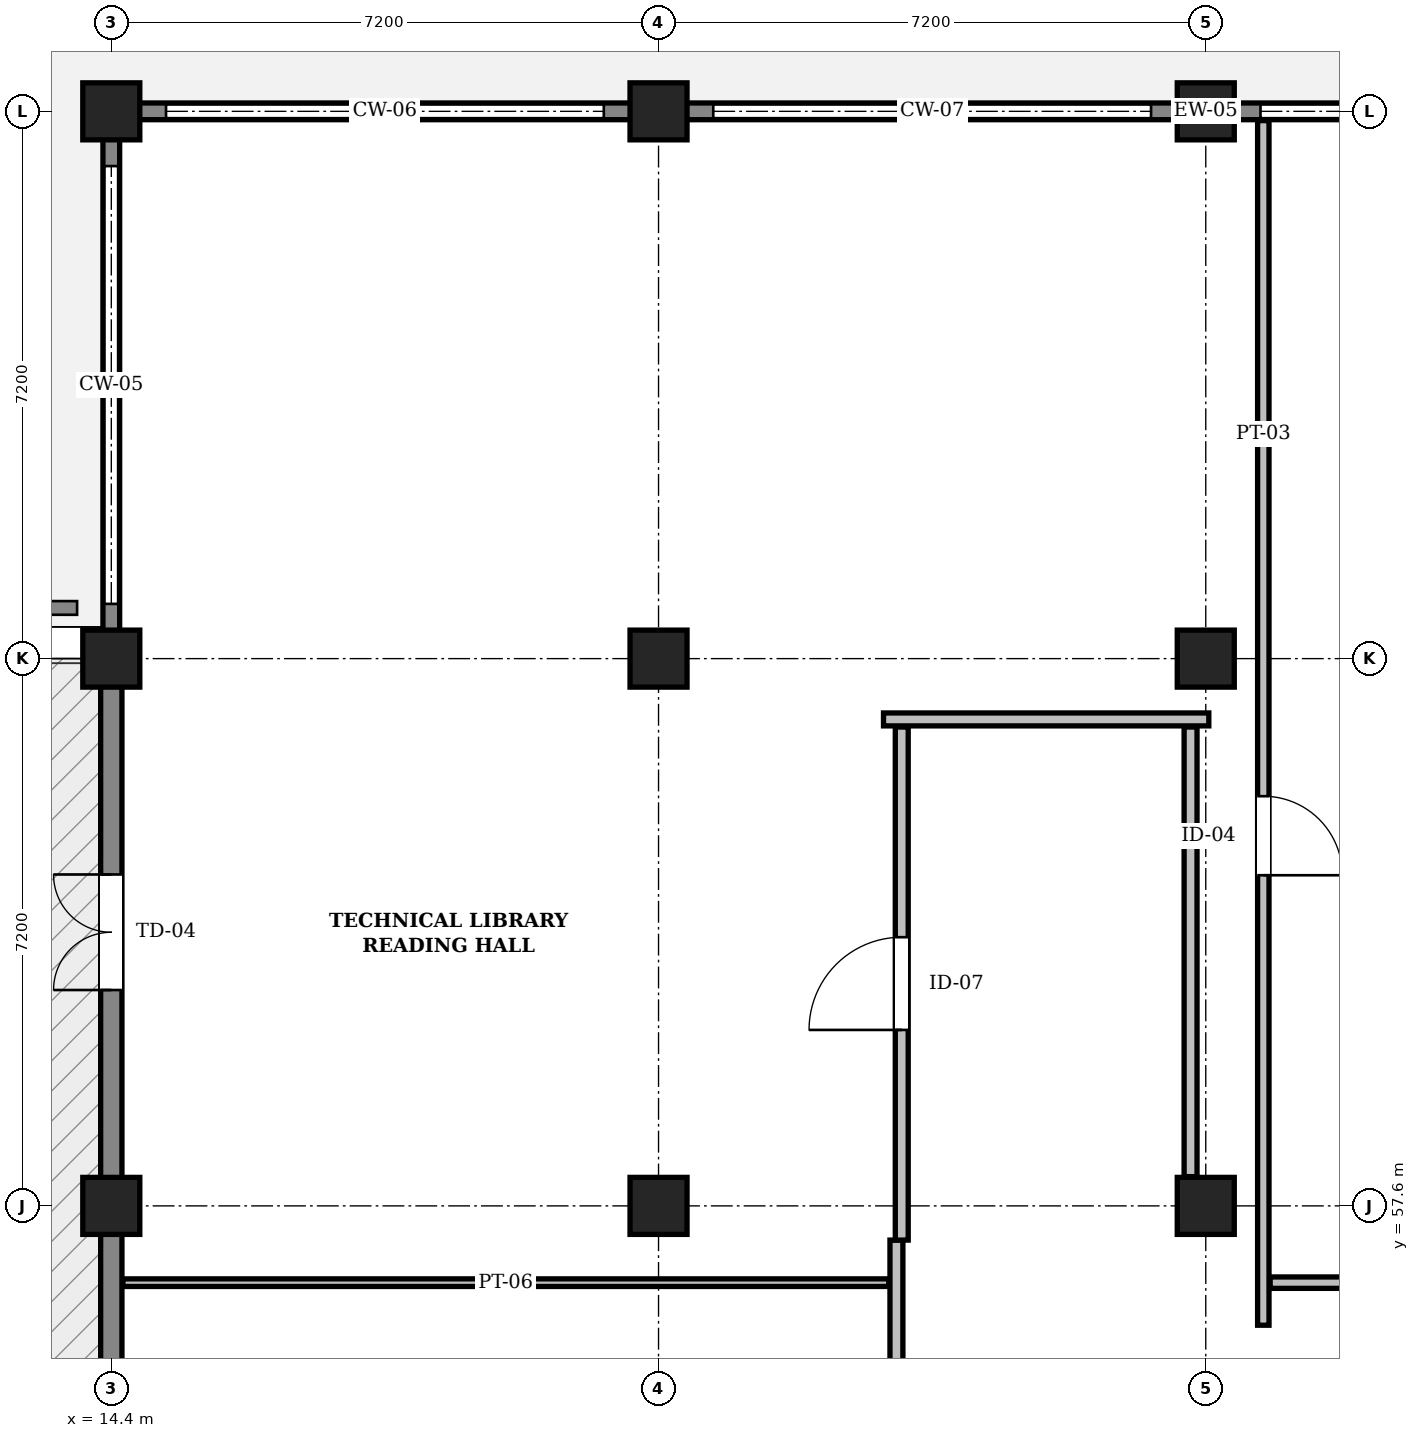
"""IFC4 building model, lengths in metres.
Left out: names, types, materials, properties, quantities, classifications, styles, units other than length and angle.
Written with IfcOpenShell. Run it as: python <this file> out.ifc"""

import sys

from ifc_helpers import new_model, si_unit, direction, frame, frame_2d, origin, origin_2d, place, context, subcontext, project, spatial, rectangle, extrude, element, fill, save


model = new_model("IFC4")
c1 = context("Model", 3, precision=1e-05, world=origin(), true_north=direction((0.0, 1.0)))
c2 = subcontext(c1, "Body", "Model", "MODEL_VIEW")
j1 = project(units=[si_unit("LENGTHUNIT", "METRE"), si_unit("PLANEANGLEUNIT", "RADIAN")], contexts=[c1])
p1 = place(None, origin())
s1 = spatial("IfcSite", under=j1, at=p1, CompositionType="ELEMENT")
p2 = place(p1, origin())
s2 = spatial("IfcBuilding", under=s1, at=p2, CompositionType="ELEMENT")
p3 = place(p2, frame((0.0, 0.0, 14.4)))
s3 = spatial("IfcBuildingStorey", under=s2, at=p3, CompositionType="ELEMENT", Elevation=14.4)
for number, where, z_axis, x_axis in (
    (1, (14.4, 57.6, 0.0), (0.0, 0.0, 1.0), (1.0, 0.0, 0.0)),
    (2, (14.4, 64.8, 0.0), (0.0, 0.0, 1.0), (1.0, 0.0, 0.0)),
    (3, (14.4, 72.0, 0.0), (0.0, 0.0, 1.0), (1.0, 0.0, 0.0)),
    (4, (21.6, 57.6, 0.0), (0.0, 0.0, 1.0), (1.0, 0.0, 0.0)),
    (5, (21.6, 64.8, 0.0), (0.0, 0.0, 1.0), (1.0, 0.0, 0.0)),
    (6, (21.6, 72.0, 0.0), (0.0, 0.0, 1.0), (1.0, 0.0, 0.0)),
    (7, (28.8, 57.6, 0.0), (0.0, 0.0, 1.0), (1.0, 0.0, 0.0)),
    (8, (28.8, 64.8, 0.0), (0.0, 0.0, 1.0), (1.0, 0.0, 0.0)),
    (9, (28.8, 72.0, 0.0), (0.0, 0.0, 1.0), (1.0, 0.0, 0.0)),
):
    element("IfcColumn", number, at=place(p3, frame(where, z_axis=z_axis, x_axis=x_axis)), inside=s3, PredefinedType="COLUMN", context=c2, shape_type="SweptSolid", body=[
        extrude(rectangle(XDim=0.75, YDim=0.75, at=origin_2d()), origin(), (0.0, 0.0, 1.0), 4.5),
    ])
p4 = place(p3, frame((14.4, 50.4, 0.0), z_axis=(0.0, 0.0, 1.0), x_axis=(0.0, 1.0, 0.0)))
e10 = element("IfcWall", 10, at=p4, inside=s3, PredefinedType="SOLIDWALL", context=c2, shape_type="SweptSolid", body=[
    extrude(rectangle(XDim=7.2, YDim=0.28, at=frame_2d((3.6, 0.0))), origin(), (0.0, 0.0, 1.0), 4.22),
])
p5 = place(p4, frame((2.94, 0.0, 0.0)))
e11 = element("IfcOpeningElement", 11, at=p5, cuts=e10, PredefinedType="OPENING", context=c2, shape_type="SweptSolid", body=[
    extrude(rectangle(XDim=1.32, YDim=2.2, at=frame_2d((0.66, 1.1))), frame((0.0, 0.152, 0.0), z_axis=(0.0, -1.0, 0.0), x_axis=(1.0, 0.0, 0.0)), (0.0, 0.0, 1.0), 0.304),
])
p6 = place(p3, frame((14.4, 57.6, 0.0), z_axis=(0.0, 0.0, 1.0), x_axis=(0.0, 1.0, 0.0)))
e12 = element("IfcWall", 12, at=p6, inside=s3, PredefinedType="SOLIDWALL", context=c2, shape_type="SweptSolid", body=[
    extrude(rectangle(XDim=7.2, YDim=0.28, at=frame_2d((3.6, 0.0))), origin(), (0.0, 0.0, 1.0), 4.22),
])
p7 = place(p6, frame((2.84, 0.0, 0.0)))
e13 = element("IfcOpeningElement", 13, at=p7, cuts=e12, PredefinedType="OPENING", context=c2, shape_type="SweptSolid", body=[
    extrude(rectangle(XDim=1.52, YDim=2.22, at=frame_2d((0.76, 1.11))), frame((0.0, 0.152, 0.0), z_axis=(0.0, -1.0, 0.0), x_axis=(1.0, 0.0, 0.0)), (0.0, 0.0, 1.0), 0.304),
])
p8 = place(p3, frame((14.4, 64.8, 0.0), z_axis=(0.0, 0.0, 1.0), x_axis=(0.0, 1.0, 0.0)))
e14 = element("IfcWall", 14, at=p8, inside=s3, PredefinedType="SOLIDWALL", context=c2, shape_type="SweptSolid", body=[
    extrude(rectangle(XDim=7.048, YDim=0.22, at=frame_2d((3.524, 0.0))), origin(), (0.0, 0.0, 1.0), 1.24),
])
p9 = place(p3, frame((14.25, 72.0, 0.0), z_axis=(0.0, 0.0, 1.0), x_axis=(1.0, 0.0, 0.0)))
e15 = element("IfcWall", 15, at=p9, inside=s3, PredefinedType="SOLIDWALL", context=c2, shape_type="SweptSolid", body=[
    extrude(rectangle(XDim=7.35, YDim=0.22, at=frame_2d((3.675, 0.0))), origin(), (0.0, 0.0, 1.0), 1.24),
])
for number, where, z_axis, x_axis in (
    (16, (21.6, 72.0, 0.0), (0.0, 0.0, 1.0), (1.0, 0.0, 0.0)),
    (17, (28.8, 72.0, 0.0), (0.0, 0.0, 1.0), (1.0, 0.0, 0.0)),
):
    element("IfcWall", number, at=place(p3, frame(where, z_axis=z_axis, x_axis=x_axis)), inside=s3, PredefinedType="SOLIDWALL", context=c2, shape_type="SweptSolid", body=[
        extrude(rectangle(XDim=7.2, YDim=0.22, at=frame_2d((3.6, 0.0))), origin(), (0.0, 0.0, 1.0), 1.24),
    ])
p10 = place(p3, frame((13.95, 65.467, 0.0), z_axis=(0.0, 0.0, 1.0), x_axis=(-0.999999401079, 0.001094459691, 0.0)))
e18 = element("IfcWall", 18, at=p10, inside=s3, PredefinedType="PARAPET", context=c2, shape_type="SweptSolid", body=[
    extrude(rectangle(XDim=2.9, YDim=0.18, at=frame_2d((1.45, 0.0))), origin(), (0.0, 0.0, 1.0), 0.95),
])
p11 = place(p3, frame((24.73, 38.372, 0.0), z_axis=(0.0, 0.0, 1.0), x_axis=(0.0, 1.0, 0.0)))
e19 = element("IfcWall", 19, at=p11, inside=s3, PredefinedType="PARTITIONING", context=c2, shape_type="SweptSolid", body=[
    extrude(rectangle(XDim=18.778, YDim=0.17, at=frame_2d((9.389, 0.0))), origin(), (0.0, 0.0, 1.0), 4.16),
])
p12 = place(p11, frame((8.549, 0.0, 0.0)))
e20 = element("IfcOpeningElement", 20, at=p12, cuts=e19, PredefinedType="OPENING", context=c2, shape_type="SweptSolid", body=[
    extrude(rectangle(XDim=1.68, YDim=2.28, at=frame_2d((0.84, 1.14))), frame((0.0, 0.097, 0.0), z_axis=(0.0, -1.0, 0.0), x_axis=(1.0, 0.0, 0.0)), (0.0, 0.0, 1.0), 0.194),
])
p13 = place(p3, frame((24.56, 64.0, 0.0), z_axis=(0.0, 0.0, 1.0), x_axis=(1.0, 0.0, 0.0)))
e21 = element("IfcWall", 21, at=p13, inside=s3, PredefinedType="PARTITIONING", context=c2, shape_type="SweptSolid", body=[
    extrude(rectangle(XDim=4.28, YDim=0.17, at=frame_2d((2.14, 0.0))), origin(), (0.0, 0.0, 1.0), 4.16),
])
p14 = place(p3, frame((28.6, 57.985, 0.0), z_axis=(0.0, 0.0, 1.0), x_axis=(0.0, 1.0, 0.0)))
e22 = element("IfcWall", 22, at=p14, inside=s3, PredefinedType="PARTITIONING", context=c2, shape_type="SweptSolid", body=[
    extrude(rectangle(XDim=5.915, YDim=0.17, at=frame_2d((2.958, 0.0))), origin(), (0.0, 0.0, 1.0), 3.73),
])
p15 = place(p3, frame((24.8, 57.15, 0.0), z_axis=(0.0, 0.0, 1.0), x_axis=(0.0, 1.0, 0.0)))
e23 = element("IfcWall", 23, at=p15, inside=s3, PredefinedType="PARTITIONING", context=c2, shape_type="SweptSolid", body=[
    extrude(rectangle(XDim=6.75, YDim=0.17, at=frame_2d((3.375, 0.0))), origin(), (0.0, 0.0, 1.0), 4.16),
])
p16 = place(p15, frame((2.765, 0.0, 0.0)))
e24 = element("IfcOpeningElement", 24, at=p16, cuts=e23, PredefinedType="OPENING", context=c2, shape_type="SweptSolid", body=[
    extrude(rectangle(XDim=1.22, YDim=2.22, at=frame_2d((0.61, 1.11))), frame((0.0, 0.097, 0.0), z_axis=(0.0, -1.0, 0.0), x_axis=(1.0, 0.0, 0.0)), (0.0, 0.0, 1.0), 0.194),
])
p17 = place(p3, frame((14.552, 56.59, 0.0), z_axis=(0.0, 0.0, 1.0), x_axis=(1.0, 0.0, 0.0)))
e25 = element("IfcWall", 25, at=p17, inside=s3, PredefinedType="PARTITIONING", context=c2, shape_type="SweptSolid", body=[
    extrude(rectangle(XDim=10.078, YDim=0.1, at=frame_2d((5.039, 0.0))), origin(), (0.0, 0.0, 1.0), 4.16),
])
p18 = place(p3, frame((29.557, 56.03, 0.0), z_axis=(0.0, 0.0, 1.0), x_axis=(0.0, 1.0, 0.0)))
e26 = element("IfcWall", 26, at=p18, inside=s3, PredefinedType="PARTITIONING", context=c2, shape_type="SweptSolid", body=[
    extrude(rectangle(XDim=15.848, YDim=0.15, at=frame_2d((7.924, 0.0))), origin(), (0.0, 0.0, 1.0), 4.16),
])
p19 = place(p18, frame((5.92, 0.0, 0.0)))
e27 = element("IfcOpeningElement", 27, at=p19, cuts=e26, PredefinedType="OPENING", context=c2, shape_type="SweptSolid", body=[
    extrude(rectangle(XDim=1.04, YDim=2.18, at=frame_2d((0.52, 1.09))), frame((0.0, 0.087, 0.0), z_axis=(0.0, -1.0, 0.0), x_axis=(1.0, 0.0, 0.0)), (0.0, 0.0, 1.0), 0.174),
])
p20 = place(p3, frame((29.647, 56.59, 0.0), z_axis=(0.0, 0.0, 1.0), x_axis=(1.0, 0.0, 0.0)))
e28 = element("IfcWall", 28, at=p20, inside=s3, PredefinedType="PARTITIONING", context=c2, shape_type="SweptSolid", body=[
    extrude(rectangle(XDim=10.198, YDim=0.15, at=frame_2d((5.099, 0.0))), origin(), (0.0, 0.0, 1.0), 4.16),
])
p21 = place(p7, origin())
e29 = element("IfcDoor", 29, at=p21, inside=s3, OperationType="DOUBLE_DOOR_SINGLE_SWING", PredefinedType="DOOR", context=c2, shape_type="SweptSolid", body=[
    extrude(rectangle(XDim=1.52, YDim=2.22, at=frame_2d((0.76, 1.11))), frame((0.0, 0.025, 0.0), z_axis=(0.0, -1.0, 0.0), x_axis=(1.0, 0.0, 0.0)), (0.0, 0.0, 1.0), 0.05),
])
fill(e13, e29)
p22 = place(p16, origin())
e30 = element("IfcDoor", 30, at=p22, inside=s3, OperationType="SINGLE_SWING_LEFT", PredefinedType="DOOR", context=c2, shape_type="SweptSolid", body=[
    extrude(rectangle(XDim=1.22, YDim=2.22, at=frame_2d((0.61, 1.11))), frame((0.0, 0.025, 0.0), z_axis=(0.0, -1.0, 0.0), x_axis=(1.0, 0.0, 0.0)), (0.0, 0.0, 1.0), 0.05),
])
fill(e24, e30)
p23 = place(p19, frame((1.04, 0.0, 0.0), z_axis=(0.0, 0.0, 1.0), x_axis=(-1.0, 0.0, 0.0)))
e31 = element("IfcDoor", 31, at=p23, inside=s3, OperationType="SINGLE_SWING_RIGHT", PredefinedType="DOOR", context=c2, shape_type="SweptSolid", body=[
    extrude(rectangle(XDim=1.04, YDim=2.18, at=frame_2d((0.52, 1.09))), frame((0.0, 0.025, 0.0), z_axis=(0.0, -1.0, 0.0), x_axis=(1.0, 0.0, 0.0)), (0.0, 0.0, 1.0), 0.05),
])
fill(e27, e31)
save(model, sys.argv[1])
